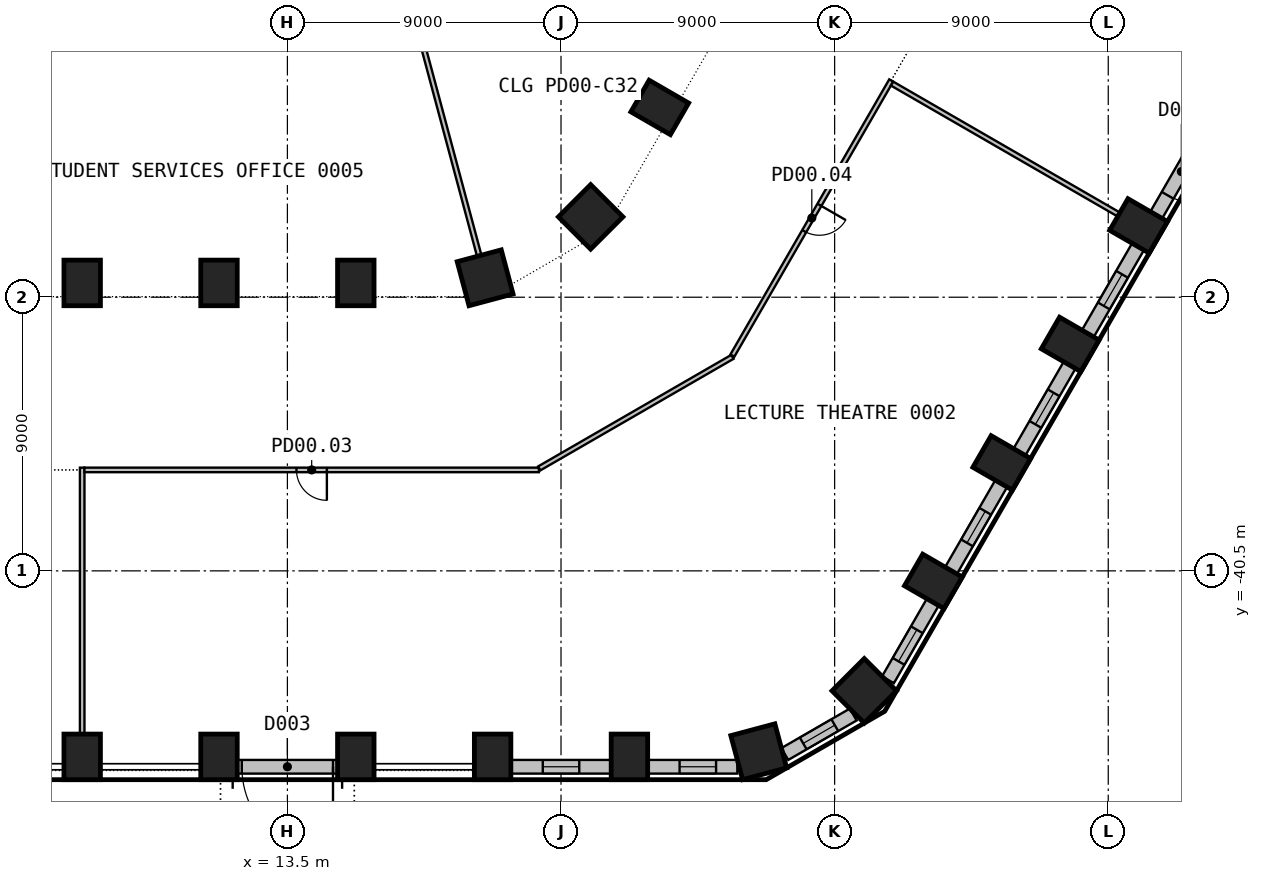
"""IFC4 building model, lengths in metres.
Left out: names, types, materials, properties, quantities, classifications, styles, units other than length and angle.
Written with IfcOpenShell. Run it as: python <this file> out.ifc"""

import sys

from ifc_helpers import new_model, si_unit, direction, frame, frame_2d, origin, origin_2d, place, context, subcontext, project, spatial, rectangle, extrude, element, fill, save


model = new_model("IFC4")
c1 = context("Model", 3, precision=1e-05, world=origin(), true_north=direction((0.0, 1.0)))
c2 = subcontext(c1, "Body", "Model", "MODEL_VIEW")
j1 = project(units=[si_unit("LENGTHUNIT", "METRE"), si_unit("PLANEANGLEUNIT", "RADIAN")], contexts=[c1])
p1 = place(None, origin())
s1 = spatial("IfcSite", under=j1, at=p1, CompositionType="ELEMENT")
p2 = place(p1, origin())
s2 = spatial("IfcBuilding", under=s1, at=p2, CompositionType="ELEMENT")
p3 = place(p2, origin())
s3 = spatial("IfcBuildingStorey", under=s2, at=p3, CompositionType="ELEMENT", Elevation=0.0)
for number, where, z_axis, x_axis in (
    (1, (6.75, -46.618, 0.0), (0.0, 0.0, 1.0), (1.0, 0.0, 0.0)),
    (2, (11.25, -46.618, 0.0), (0.0, 0.0, 1.0), (1.0, 0.0, 0.0)),
    (3, (15.75, -46.618, 0.0), (0.0, 0.0, 1.0), (1.0, 0.0, 0.0)),
    (4, (20.25, -46.618, 0.0), (0.0, 0.0, 1.0), (1.0, 0.0, 0.0)),
    (5, (24.75, -46.618, 0.0), (0.0, 0.0, 1.0), (1.0, 0.0, 0.0)),
):
    element("IfcColumn", number, at=place(p3, frame(where, z_axis=z_axis, x_axis=x_axis)), inside=s3, PredefinedType="COLUMN", context=c2, shape_type="SweptSolid", body=[
        extrude(rectangle(XDim=1.2, YDim=1.5, at=origin_2d()), origin(), (0.0, 0.0, 1.0), 6.0),
    ])
for number, where, z_axis, x_axis in (
    (6, (29.004, -46.45, 0.0), (0.0, 0.0, 1.0), (0.966, 0.259, 0.0)),
    (7, (32.475, -44.446, 0.0), (0.0, 0.0, 1.0), (0.707, 0.707, 0.0)),
):
    element("IfcColumn", number, at=place(p3, frame(where, z_axis=z_axis, x_axis=x_axis)), inside=s3, PredefinedType="COLUMN", context=c2, shape_type="SweptSolid", body=[
        extrude(rectangle(XDim=1.5, YDim=1.5, at=origin_2d()), origin(), (0.0, 0.0, 1.0), 6.0),
    ])
for number, where, z_axis, x_axis in (
    (8, (34.748, -40.846, 0.0), (0.0, 0.0, 1.0), (0.5, 0.866, 0.0)),
    (9, (36.998, -36.949, 0.0), (0.0, 0.0, 1.0), (0.5, 0.866, 0.0)),
    (10, (39.248, -33.052, 0.0), (0.0, 0.0, 1.0), (0.5, 0.866, 0.0)),
    (11, (41.498, -29.155, 0.0), (0.0, 0.0, 1.0), (0.5, 0.866, 0.0)),
    (12, (43.748, -25.258, 0.0), (0.0, 0.0, 1.0), (0.5, 0.866, 0.0)),
):
    element("IfcColumn", number, at=place(p3, frame(where, z_axis=z_axis, x_axis=x_axis)), inside=s3, PredefinedType="COLUMN", context=c2, shape_type="SweptSolid", body=[
        extrude(rectangle(XDim=1.2, YDim=1.5, at=origin_2d()), origin(), (0.0, 0.0, 1.0), 6.0),
    ])
for number, where, z_axis, x_axis in (
    (13, (6.75, -31.03, 0.0), (0.0, 0.0, 1.0), (1.0, 0.0, 0.0)),
    (14, (11.25, -31.03, 0.0), (0.0, 0.0, 1.0), (1.0, 0.0, 0.0)),
    (15, (15.75, -31.03, 0.0), (0.0, 0.0, 1.0), (1.0, 0.0, 0.0)),
):
    element("IfcColumn", number, at=place(p3, frame(where, z_axis=z_axis, x_axis=x_axis)), inside=s3, PredefinedType="COLUMN", context=c2, shape_type="SweptSolid", body=[
        extrude(rectangle(XDim=1.2, YDim=1.5, at=origin_2d()), origin(), (0.0, 0.0, 1.0), 5.6),
    ])
for number, where, z_axis, x_axis in (
    (16, (20.004, -30.861, 0.0), (0.0, 0.0, 1.0), (0.966, 0.259, 0.0)),
    (17, (23.475, -28.857, 0.0), (0.0, 0.0, 1.0), (0.707, 0.707, 0.0)),
):
    element("IfcColumn", number, at=place(p3, frame(where, z_axis=z_axis, x_axis=x_axis)), inside=s3, PredefinedType="COLUMN", context=c2, shape_type="SweptSolid", body=[
        extrude(rectangle(XDim=1.5, YDim=1.5, at=origin_2d()), origin(), (0.0, 0.0, 1.0), 5.6),
    ])
p4 = place(p3, frame((25.748, -25.258, 0.0), z_axis=(0.0, 0.0, 1.0), x_axis=(0.5, 0.866025403784, 0.0)))
e18 = element("IfcColumn", 18, at=p4, inside=s3, PredefinedType="COLUMN", context=c2, shape_type="SweptSolid", body=[
    extrude(rectangle(XDim=1.2, YDim=1.5, at=origin_2d()), origin(), (0.0, 0.0, 1.0), 5.6),
])
p5 = place(p3, frame((15.149, -46.943, 0.0), z_axis=(0.0, 0.0, 1.0), x_axis=(-1.0, 0.0, 0.0)))
e19 = element("IfcWall", 19, at=p5, inside=s3, PredefinedType="SOLIDWALL", context=c2, shape_type="SweptSolid", body=[
    extrude(rectangle(XDim=3.299, YDim=0.45, at=frame_2d((1.649, 0.0))), origin(), (0.0, 0.0, 1.0), 6.0),
])
p6 = place(p5, frame((0.149, 0.0, 0.0)))
e20 = element("IfcOpeningElement", 20, at=p6, cuts=e19, PredefinedType="OPENING", context=c2, shape_type="SweptSolid", body=[
    extrude(rectangle(XDim=3.0, YDim=4.2, at=frame_2d((1.5, 2.1))), frame((0.0, 0.235, 0.0), z_axis=(0.0, -1.0, 0.0), x_axis=(1.0, 0.0, 0.0)), (0.0, 0.0, 1.0), 0.47),
])
p7 = place(p3, frame((20.851, -46.943, 0.0), z_axis=(0.0, 0.0, 1.0), x_axis=(1.0, 0.0, 0.0)))
e21 = element("IfcWall", 21, at=p7, inside=s3, PredefinedType="SOLIDWALL", context=c2, shape_type="SweptSolid", body=[
    extrude(rectangle(XDim=3.299, YDim=0.45, at=frame_2d((1.649, 0.0))), origin(), (0.0, 0.0, 1.0), 6.0),
])
p8 = place(p7, frame((1.05, 0.0, 0.9)))
e22 = element("IfcOpeningElement", 22, at=p8, cuts=e21, PredefinedType="OPENING", context=c2, shape_type="SweptSolid", body=[
    extrude(rectangle(XDim=1.2, YDim=4.2, at=frame_2d((0.6, 2.1))), frame((0.0, 0.235, 0.0), z_axis=(0.0, -1.0, 0.0), x_axis=(1.0, 0.0, 0.0)), (0.0, 0.0, 1.0), 0.47),
])
p9 = place(p3, frame((25.351, -46.943, 0.0), z_axis=(0.0, 0.0, 1.0), x_axis=(1.0, 0.0, 0.0)))
e23 = element("IfcWall", 23, at=p9, inside=s3, PredefinedType="SOLIDWALL", context=c2, shape_type="SweptSolid", body=[
    extrude(rectangle(XDim=2.948, YDim=0.45, at=frame_2d((1.474, 0.0))), origin(), (0.0, 0.0, 1.0), 6.0),
])
p10 = place(p9, frame((1.05, 0.0, 0.9)))
e24 = element("IfcOpeningElement", 24, at=p10, cuts=e23, PredefinedType="OPENING", context=c2, shape_type="SweptSolid", body=[
    extrude(rectangle(XDim=1.2, YDim=4.2, at=frame_2d((0.6, 2.1))), frame((0.0, 0.235, 0.0), z_axis=(0.0, -1.0, 0.0), x_axis=(1.0, 0.0, 0.0)), (0.0, 0.0, 1.0), 0.47),
])
p11 = place(p3, frame((29.861, -46.525, 0.0), z_axis=(0.0, 0.0, 1.0), x_axis=(0.866019710441, 0.50000986103, 0.0)))
e25 = element("IfcWall", 25, at=p11, inside=s3, PredefinedType="SOLIDWALL", context=c2, shape_type="SweptSolid", body=[
    extrude(rectangle(XDim=2.598, YDim=0.45, at=frame_2d((1.299, 0.0))), origin(), (0.0, 0.0, 1.0), 6.0),
])
p12 = place(p11, frame((0.699, 0.0, 0.9)))
e26 = element("IfcOpeningElement", 26, at=p12, cuts=e25, PredefinedType="OPENING", context=c2, shape_type="SweptSolid", body=[
    extrude(rectangle(XDim=1.2, YDim=4.2, at=frame_2d((0.6, 2.1))), frame((0.0, 0.235, 0.0), z_axis=(0.0, -1.0, 0.0), x_axis=(1.0, 0.0, 0.0)), (0.0, 0.0, 1.0), 0.47),
])
p13 = place(p3, frame((33.254, -44.082, 0.0), z_axis=(0.0, 0.0, 1.0), x_axis=(0.500030648271, 0.866007708274, 0.0)))
e27 = element("IfcWall", 27, at=p13, inside=s3, PredefinedType="SOLIDWALL", context=c2, shape_type="SweptSolid", body=[
    extrude(rectangle(XDim=2.948, YDim=0.45, at=frame_2d((1.474, 0.0))), origin(), (0.0, 0.0, 1.0), 6.0),
])
p14 = place(p13, frame((0.699, 0.0, 0.9)))
e28 = element("IfcOpeningElement", 28, at=p14, cuts=e27, PredefinedType="OPENING", context=c2, shape_type="SweptSolid", body=[
    extrude(rectangle(XDim=1.2, YDim=4.2, at=frame_2d((0.6, 2.1))), frame((0.0, 0.235, 0.0), z_axis=(0.0, -1.0, 0.0), x_axis=(1.0, 0.0, 0.0)), (0.0, 0.0, 1.0), 0.47),
])
p15 = place(p3, frame((35.329, -40.489, 0.0), z_axis=(0.0, 0.0, 1.0), x_axis=(0.499991515992, 0.866030301974, 0.0)))
e29 = element("IfcWall", 29, at=p15, inside=s3, PredefinedType="SOLIDWALL", context=c2, shape_type="SweptSolid", body=[
    extrude(rectangle(XDim=3.299, YDim=0.45, at=frame_2d((1.649, 0.0))), origin(), (0.0, 0.0, 1.0), 6.0),
])
p16 = place(p15, frame((1.05, 0.0, 0.9)))
e30 = element("IfcOpeningElement", 30, at=p16, cuts=e29, PredefinedType="OPENING", context=c2, shape_type="SweptSolid", body=[
    extrude(rectangle(XDim=1.2, YDim=4.2, at=frame_2d((0.6, 2.1))), frame((0.0, 0.235, 0.0), z_axis=(0.0, -1.0, 0.0), x_axis=(1.0, 0.0, 0.0)), (0.0, 0.0, 1.0), 0.47),
])
p17 = place(p3, frame((37.579, -36.592, 0.0), z_axis=(0.0, 0.0, 1.0), x_axis=(0.499991515992, 0.866030301974, 0.0)))
e31 = element("IfcWall", 31, at=p17, inside=s3, PredefinedType="SOLIDWALL", context=c2, shape_type="SweptSolid", body=[
    extrude(rectangle(XDim=3.299, YDim=0.45, at=frame_2d((1.649, 0.0))), origin(), (0.0, 0.0, 1.0), 6.0),
])
p18 = place(p17, frame((1.05, 0.0, 0.9)))
e32 = element("IfcOpeningElement", 32, at=p18, cuts=e31, PredefinedType="OPENING", context=c2, shape_type="SweptSolid", body=[
    extrude(rectangle(XDim=1.2, YDim=4.2, at=frame_2d((0.6, 2.1))), frame((0.0, 0.235, 0.0), z_axis=(0.0, -1.0, 0.0), x_axis=(1.0, 0.0, 0.0)), (0.0, 0.0, 1.0), 0.47),
])
p19 = place(p3, frame((39.829, -32.694, 0.0), z_axis=(0.0, 0.0, 1.0), x_axis=(0.499991515992, 0.866030301974, 0.0)))
e33 = element("IfcWall", 33, at=p19, inside=s3, PredefinedType="SOLIDWALL", context=c2, shape_type="SweptSolid", body=[
    extrude(rectangle(XDim=3.299, YDim=0.45, at=frame_2d((1.649, 0.0))), origin(), (0.0, 0.0, 1.0), 6.0),
])
p20 = place(p19, frame((1.05, 0.0, 0.9)))
e34 = element("IfcOpeningElement", 34, at=p20, cuts=e33, PredefinedType="OPENING", context=c2, shape_type="SweptSolid", body=[
    extrude(rectangle(XDim=1.2, YDim=4.2, at=frame_2d((0.6, 2.1))), frame((0.0, 0.235, 0.0), z_axis=(0.0, -1.0, 0.0), x_axis=(1.0, 0.0, 0.0)), (0.0, 0.0, 1.0), 0.47),
])
p21 = place(p3, frame((43.729, -25.94, 0.0), z_axis=(0.0, 0.0, 1.0), x_axis=(-0.49995947208, -0.866048801325, 0.0)))
e35 = element("IfcWall", 35, at=p21, inside=s3, PredefinedType="SOLIDWALL", context=c2, shape_type="SweptSolid", body=[
    extrude(rectangle(XDim=3.299, YDim=0.45, at=frame_2d((1.649, 0.0))), origin(), (0.0, 0.0, 1.0), 6.0),
])
p22 = place(p21, frame((0.75, 0.0, 0.0)))
e36 = element("IfcOpeningElement", 36, at=p22, cuts=e35, PredefinedType="OPENING", context=c2, shape_type="SweptSolid", body=[
    extrude(rectangle(XDim=1.8, YDim=2.4, at=frame_2d((0.9, 1.2))), frame((0.0, 0.235, 0.0), z_axis=(0.0, -1.0, 0.0), x_axis=(1.0, 0.0, 0.0)), (0.0, 0.0, 1.0), 0.47),
])
p23 = place(p3, frame((6.75, -37.105, 0.0), z_axis=(0.0, 0.0, 1.0), x_axis=(0.0, -1.0, 0.0)))
e37 = element("IfcWall", 37, at=p23, inside=s3, PredefinedType="PARTITIONING", context=c2, shape_type="SweptSolid", body=[
    extrude(rectangle(XDim=8.743, YDim=0.15, at=frame_2d((4.372, 0.0))), origin(), (0.0, 0.0, 1.0), 6.0),
])
p24 = place(p3, frame((21.772, -37.18, 0.0), z_axis=(0.0, 0.0, 1.0), x_axis=(-1.0, 0.0, 0.0)))
e38 = element("IfcWall", 38, at=p24, inside=s3, PredefinedType="PARTITIONING", context=c2, shape_type="SweptSolid", body=[
    extrude(rectangle(XDim=14.947, YDim=0.15, at=frame_2d((7.474, 0.0))), origin(), (0.0, 0.0, 1.0), 6.0),
])
p25 = place(p24, frame((6.973, 0.0, 0.0)))
e39 = element("IfcOpeningElement", 39, at=p25, cuts=e38, PredefinedType="OPENING", context=c2, shape_type="SweptSolid", body=[
    extrude(rectangle(XDim=1.0, YDim=2.1, at=frame_2d((0.5, 1.05))), frame((0.0, 0.085, 0.0), z_axis=(0.0, -1.0, 0.0), x_axis=(1.0, 0.0, 0.0)), (0.0, 0.0, 1.0), 0.17),
])
p26 = place(p3, frame((17.362, -21.0, 0.0), z_axis=(0.0, 0.0, 1.0), x_axis=(0.258805468398, -0.965929464054, 0.0)))
e40 = element("IfcWall", 40, at=p26, inside=s3, PredefinedType="PARTITIONING", context=c2, shape_type="SweptSolid", body=[
    extrude(rectangle(XDim=9.439, YDim=0.15, at=frame_2d((4.719, 0.0))), origin(), (0.0, 0.0, 1.0), 5.6),
])
p27 = place(p3, frame((28.139, -33.46, 0.0), z_axis=(0.0, 0.0, 1.0), x_axis=(-0.866011067739, -0.500024829938, 0.0)))
e41 = element("IfcWall", 41, at=p27, inside=s3, PredefinedType="PARTITIONING", context=c2, shape_type="SweptSolid", body=[
    extrude(rectangle(XDim=7.339, YDim=0.15, at=frame_2d((3.669, 0.0))), origin(), (0.0, 0.0, 1.0), 6.0),
])
p28 = place(p3, frame((33.362, -24.371, 0.0), z_axis=(0.0, 0.0, 1.0), x_axis=(-0.500054877109, -0.865993718152, 0.0)))
e42 = element("IfcWall", 42, at=p28, inside=s3, PredefinedType="PARTITIONING", context=c2, shape_type="SweptSolid", body=[
    extrude(rectangle(XDim=10.447, YDim=0.15, at=frame_2d((5.224, 0.0))), origin(), (0.0, 0.0, 1.0), 6.0),
])
p29 = place(p28, frame((4.723, 0.0, 0.0)))
e43 = element("IfcOpeningElement", 43, at=p29, cuts=e42, PredefinedType="OPENING", context=c2, shape_type="SweptSolid", body=[
    extrude(rectangle(XDim=1.0, YDim=2.1, at=frame_2d((0.5, 1.05))), frame((0.0, 0.085, 0.0), z_axis=(0.0, -1.0, 0.0), x_axis=(1.0, 0.0, 0.0)), (0.0, 0.0, 1.0), 0.17),
])
p30 = place(p3, frame((40.831, -28.77, 0.0), z_axis=(0.0, 0.0, 1.0), x_axis=(-0.866015728299, 0.500016758057, 0.0)))
e44 = element("IfcWall", 44, at=p30, inside=s3, PredefinedType="PARTITIONING", context=c2, shape_type="SweptSolid", body=[
    extrude(rectangle(XDim=8.593, YDim=0.15, at=frame_2d((4.296, 0.0))), origin(), (0.0, 0.0, 1.0), 6.0),
])
p31 = place(p6, origin())
e45 = element("IfcDoor", 45, at=p31, inside=s3, OperationType="DOUBLE_DOOR_SINGLE_SWING", PredefinedType="DOOR", context=c2, shape_type="SweptSolid", body=[
    extrude(rectangle(XDim=3.0, YDim=4.2, at=frame_2d((1.5, 2.1))), frame((0.0, 0.025, 0.0), z_axis=(0.0, -1.0, 0.0), x_axis=(1.0, 0.0, 0.0)), (0.0, 0.0, 1.0), 0.05),
])
fill(e20, e45)
p32 = place(p8, origin())
e46 = element("IfcWindow", 46, at=p32, inside=s3, PartitioningType="SINGLE_PANEL", PredefinedType="WINDOW", context=c2, shape_type="SweptSolid", body=[
    extrude(rectangle(XDim=1.2, YDim=4.2, at=frame_2d((0.6, 2.1))), frame((0.0, 0.03, 0.0), z_axis=(0.0, -1.0, 0.0), x_axis=(1.0, 0.0, 0.0)), (0.0, 0.0, 1.0), 0.06),
])
fill(e22, e46)
p33 = place(p10, origin())
e47 = element("IfcWindow", 47, at=p33, inside=s3, PartitioningType="SINGLE_PANEL", PredefinedType="WINDOW", context=c2, shape_type="SweptSolid", body=[
    extrude(rectangle(XDim=1.2, YDim=4.2, at=frame_2d((0.6, 2.1))), frame((0.0, 0.03, 0.0), z_axis=(0.0, -1.0, 0.0), x_axis=(1.0, 0.0, 0.0)), (0.0, 0.0, 1.0), 0.06),
])
fill(e24, e47)
p34 = place(p12, origin())
e48 = element("IfcWindow", 48, at=p34, inside=s3, PartitioningType="SINGLE_PANEL", PredefinedType="WINDOW", context=c2, shape_type="SweptSolid", body=[
    extrude(rectangle(XDim=1.2, YDim=4.2, at=frame_2d((0.6, 2.1))), frame((0.0, 0.03, 0.0), z_axis=(0.0, -1.0, 0.0), x_axis=(1.0, 0.0, 0.0)), (0.0, 0.0, 1.0), 0.06),
])
fill(e26, e48)
p35 = place(p14, origin())
e49 = element("IfcWindow", 49, at=p35, inside=s3, PartitioningType="SINGLE_PANEL", PredefinedType="WINDOW", context=c2, shape_type="SweptSolid", body=[
    extrude(rectangle(XDim=1.2, YDim=4.2, at=frame_2d((0.6, 2.1))), frame((0.0, 0.03, 0.0), z_axis=(0.0, -1.0, 0.0), x_axis=(1.0, 0.0, 0.0)), (0.0, 0.0, 1.0), 0.06),
])
fill(e28, e49)
p36 = place(p16, origin())
e50 = element("IfcWindow", 50, at=p36, inside=s3, PartitioningType="SINGLE_PANEL", PredefinedType="WINDOW", context=c2, shape_type="SweptSolid", body=[
    extrude(rectangle(XDim=1.2, YDim=4.2, at=frame_2d((0.6, 2.1))), frame((0.0, 0.03, 0.0), z_axis=(0.0, -1.0, 0.0), x_axis=(1.0, 0.0, 0.0)), (0.0, 0.0, 1.0), 0.06),
])
fill(e30, e50)
p37 = place(p18, origin())
e51 = element("IfcWindow", 51, at=p37, inside=s3, PartitioningType="SINGLE_PANEL", PredefinedType="WINDOW", context=c2, shape_type="SweptSolid", body=[
    extrude(rectangle(XDim=1.2, YDim=4.2, at=frame_2d((0.6, 2.1))), frame((0.0, 0.03, 0.0), z_axis=(0.0, -1.0, 0.0), x_axis=(1.0, 0.0, 0.0)), (0.0, 0.0, 1.0), 0.06),
])
fill(e32, e51)
p38 = place(p20, origin())
e52 = element("IfcWindow", 52, at=p38, inside=s3, PartitioningType="SINGLE_PANEL", PredefinedType="WINDOW", context=c2, shape_type="SweptSolid", body=[
    extrude(rectangle(XDim=1.2, YDim=4.2, at=frame_2d((0.6, 2.1))), frame((0.0, 0.03, 0.0), z_axis=(0.0, -1.0, 0.0), x_axis=(1.0, 0.0, 0.0)), (0.0, 0.0, 1.0), 0.06),
])
fill(e34, e52)
p39 = place(p22, origin())
e53 = element("IfcDoor", 53, at=p39, inside=s3, OperationType="DOUBLE_DOOR_SINGLE_SWING", PredefinedType="DOOR", context=c2, shape_type="SweptSolid", body=[
    extrude(rectangle(XDim=1.8, YDim=2.4, at=frame_2d((0.9, 1.2))), frame((0.0, 0.025, 0.0), z_axis=(0.0, -1.0, 0.0), x_axis=(1.0, 0.0, 0.0)), (0.0, 0.0, 1.0), 0.05),
])
fill(e36, e53)
p40 = place(p25, origin())
e54 = element("IfcDoor", 54, at=p40, inside=s3, OperationType="SINGLE_SWING_LEFT", PredefinedType="DOOR", context=c2, shape_type="SweptSolid", body=[
    extrude(rectangle(XDim=1.0, YDim=2.1, at=frame_2d((0.5, 1.05))), frame((0.0, 0.025, 0.0), z_axis=(0.0, -1.0, 0.0), x_axis=(1.0, 0.0, 0.0)), (0.0, 0.0, 1.0), 0.05),
])
fill(e39, e54)
p41 = place(p29, origin())
e55 = element("IfcDoor", 55, at=p41, inside=s3, OperationType="SINGLE_SWING_RIGHT", PredefinedType="DOOR", context=c2, shape_type="SweptSolid", body=[
    extrude(rectangle(XDim=1.0, YDim=2.1, at=frame_2d((0.5, 1.05))), frame((0.0, 0.025, 0.0), z_axis=(0.0, -1.0, 0.0), x_axis=(1.0, 0.0, 0.0)), (0.0, 0.0, 1.0), 0.05),
])
fill(e43, e55)
save(model, sys.argv[1])
